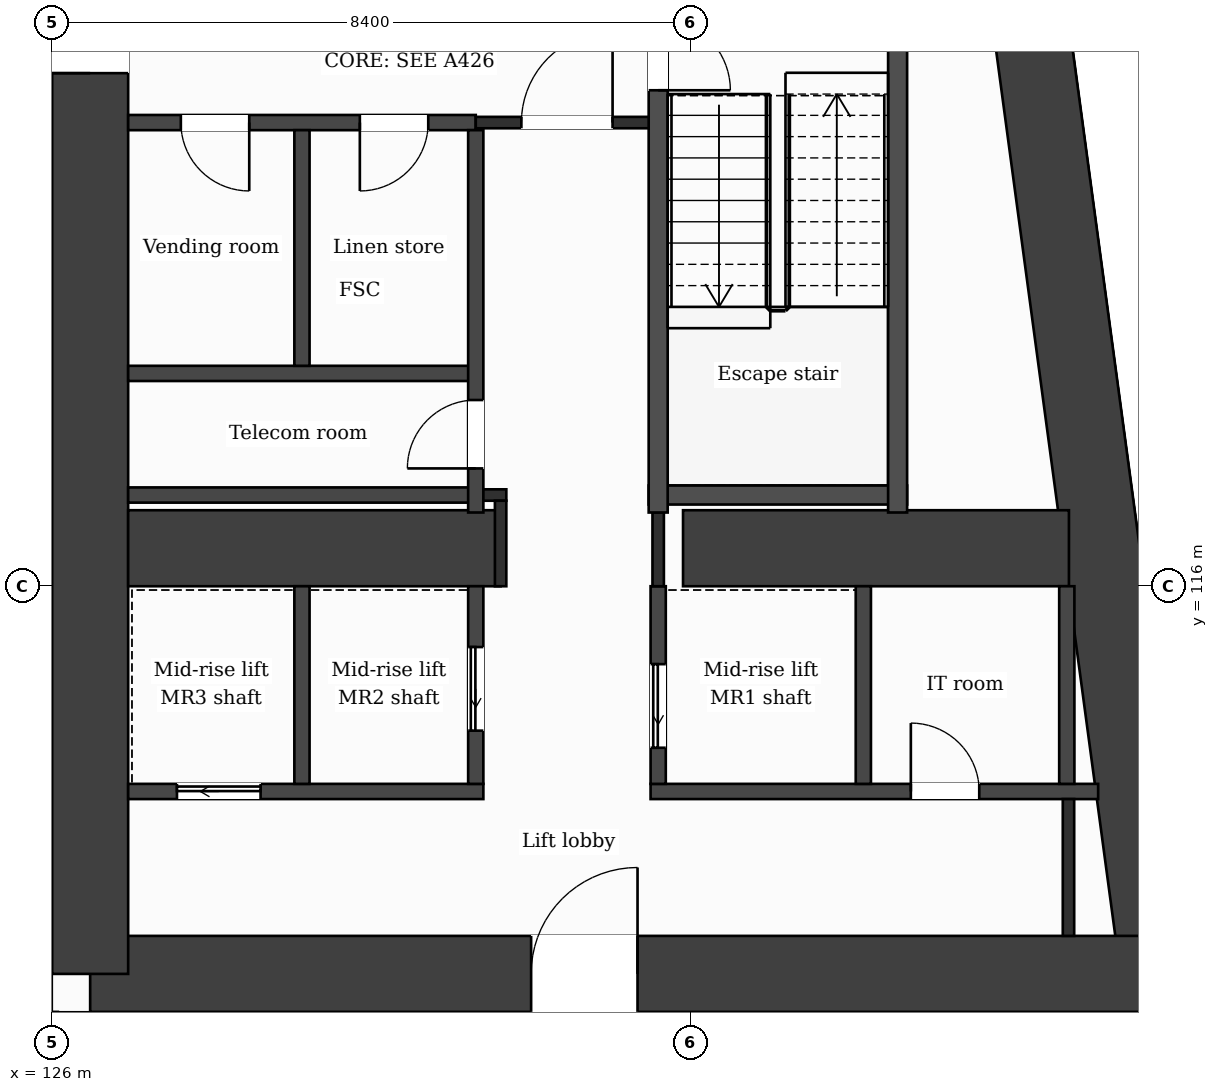
"""IFC4 building model, lengths in metres.
Left out: names, types, materials, properties, quantities, classifications, styles, units other than length and angle.
Written with IfcOpenShell. Run it as: python <this file> out.ifc"""

import sys

from ifc_helpers import new_model, si_unit, direction, frame, frame_2d, origin, place, context, subcontext, project, spatial, rectangle, extrude, element, fill, save


model = new_model("IFC4")
c1 = context("Model", 3, precision=1e-05, world=origin(), true_north=direction((0.0, 1.0)))
c2 = subcontext(c1, "Body", "Model", "MODEL_VIEW")
j1 = project(units=[si_unit("LENGTHUNIT", "METRE"), si_unit("PLANEANGLEUNIT", "RADIAN")], contexts=[c1])
p1 = place(None, origin())
s1 = spatial("IfcSite", under=j1, at=p1, CompositionType="ELEMENT")
p2 = place(p1, origin())
s2 = spatial("IfcBuilding", under=s1, at=p2, CompositionType="ELEMENT")
p3 = place(p2, frame((0.0, 0.0, 109.5)))
s3 = spatial("IfcBuildingStorey", under=s2, at=p3, CompositionType="ELEMENT", Elevation=109.5)
p4 = place(p3, frame((137.732, 131.9, 0.0), z_axis=(0.0, 0.0, 1.0), x_axis=(0.133411141623, -0.991060778808, 0.0)))
e1 = element("IfcWall", 1, at=p4, inside=s3, PredefinedType="SHEAR", context=c2, shape_type="SweptSolid", body=[
    extrude(rectangle(XDim=21.189, YDim=1.0, at=frame_2d((10.595, 0.0))), origin(), (0.0, 0.0, 1.0), 3.7),
])
p5 = place(p3, frame((140.559, 110.9, 0.0), z_axis=(0.0, 0.0, 1.0), x_axis=(-1.0, 0.0, 0.0)))
e2 = element("IfcWall", 2, at=p5, inside=s3, PredefinedType="SHEAR", context=c2, shape_type="SweptSolid", body=[
    extrude(rectangle(XDim=14.059, YDim=1.0, at=frame_2d((7.029, 0.0))), origin(), (0.0, 0.0, 1.0), 3.7),
])
p6 = place(p5, frame((6.858, 0.0, 0.0)))
e3 = element("IfcOpeningElement", 3, at=p6, cuts=e2, PredefinedType="OPENING", context=c2, shape_type="SweptSolid", body=[
    extrude(rectangle(XDim=1.4, YDim=2.1, at=frame_2d((0.7, 1.05))), frame((0.0, 0.51, 0.0), z_axis=(0.0, -1.0, 0.0), x_axis=(1.0, 0.0, 0.0)), (0.0, 0.0, 1.0), 1.02),
])
p7 = place(p3, frame((126.5, 110.9, 0.0), z_axis=(0.0, 0.0, 1.0), x_axis=(0.0, 1.0, 0.0)))
e4 = element("IfcWall", 4, at=p7, inside=s3, PredefinedType="SHEAR", context=c2, shape_type="SweptSolid", body=[
    extrude(rectangle(XDim=21.0, YDim=1.0, at=frame_2d((10.5, 0.0))), origin(), (0.0, 0.0, 1.0), 3.7),
])
p8 = place(p7, frame((11.85, 0.0, 0.0)))
e5 = element("IfcOpeningElement", 5, at=p8, cuts=e4, PredefinedType="OPENING", context=c2, shape_type="SweptSolid", body=[
    extrude(rectangle(XDim=1.4, YDim=2.1, at=frame_2d((0.7, 1.05))), frame((0.0, 0.51, 0.0), z_axis=(0.0, -1.0, 0.0), x_axis=(1.0, 0.0, 0.0)), (0.0, 0.0, 1.0), 1.02),
])
p9 = place(p3, frame((127.0, 116.5, 0.0), z_axis=(0.0, 0.0, 1.0), x_axis=(1.0, 0.0, 0.0)))
e6 = element("IfcWall", 6, at=p9, inside=s3, PredefinedType="SHEAR", context=c2, shape_type="SweptSolid", body=[
    extrude(rectangle(XDim=4.9, YDim=1.0, at=frame_2d((2.45, 0.0))), origin(), (0.0, 0.0, 1.0), 3.7),
])
p10 = place(p3, frame((134.3, 116.5, 0.0), z_axis=(0.0, 0.0, 1.0), x_axis=(1.0, 0.0, 0.0)))
e7 = element("IfcWall", 7, at=p10, inside=s3, PredefinedType="SHEAR", context=c2, shape_type="SweptSolid", body=[
    extrude(rectangle(XDim=5.077, YDim=1.0, at=frame_2d((2.539, 0.0))), origin(), (0.0, 0.0, 1.0), 3.7),
])
p11 = place(p3, frame((140.348, 103.85, 0.0), z_axis=(0.0, 0.0, 1.0), x_axis=(-0.133431549479, 0.991058031401, 0.0)))
e8 = element("IfcWall", 8, at=p11, inside=s3, PredefinedType="SOLIDWALL", context=c2, shape_type="SweptSolid", body=[
    extrude(rectangle(XDim=6.609, YDim=0.3, at=frame_2d((3.304, 0.0))), origin(), (0.0, 0.0, 1.0), 3.38),
])
p12 = place(p11, frame((0.737, 0.0, 0.9)))
e9 = element("IfcOpeningElement", 9, at=p12, cuts=e8, PredefinedType="OPENING", context=c2, shape_type="SweptSolid", body=[
    extrude(rectangle(XDim=1.2, YDim=2.1, at=frame_2d((0.6, 1.05))), frame((0.0, 0.16, 0.0), z_axis=(0.0, -1.0, 0.0), x_axis=(1.0, 0.0, 0.0)), (0.0, 0.0, 1.0), 0.32),
])
p13 = place(p11, frame((3.991, 0.0, 0.0)))
e10 = element("IfcOpeningElement", 10, at=p13, cuts=e8, PredefinedType="OPENING", context=c2, shape_type="SweptSolid", body=[
    extrude(rectangle(XDim=1.2, YDim=2.4, at=frame_2d((0.6, 1.2))), frame((0.0, 0.16, 0.0), z_axis=(0.0, -1.0, 0.0), x_axis=(1.0, 0.0, 0.0)), (0.0, 0.0, 1.0), 0.32),
])
p14 = place(p3, frame((127.0, 113.3, 0.0), z_axis=(0.0, 0.0, 1.0), x_axis=(1.0, 0.0, 0.0)))
e11 = element("IfcWall", 11, at=p14, inside=s3, PredefinedType="PARTITIONING", context=c2, shape_type="SweptSolid", body=[
    extrude(rectangle(XDim=4.673, YDim=0.2, at=frame_2d((2.336, 0.0))), origin(), (0.0, 0.0, 1.0), 3.38),
])
p15 = place(p14, frame((0.642, 0.0, 0.0)))
e12 = element("IfcOpeningElement", 12, at=p15, cuts=e11, PredefinedType="OPENING", context=c2, shape_type="SweptSolid", body=[
    extrude(rectangle(XDim=1.1, YDim=2.1, at=frame_2d((0.55, 1.05))), frame((0.0, 0.11, 0.0), z_axis=(0.0, -1.0, 0.0), x_axis=(1.0, 0.0, 0.0)), (0.0, 0.0, 1.0), 0.22),
])
p16 = place(p3, frame((133.873, 113.3, 0.0), z_axis=(0.0, 0.0, 1.0), x_axis=(1.0, 0.0, 0.0)))
e13 = element("IfcWall", 13, at=p16, inside=s3, PredefinedType="PARTITIONING", context=c2, shape_type="SweptSolid", body=[
    extrude(rectangle(XDim=5.888, YDim=0.2, at=frame_2d((2.944, 0.0))), origin(), (0.0, 0.0, 1.0), 3.38),
])
p17 = place(p16, frame((3.424, 0.0, 0.0)))
e14 = element("IfcOpeningElement", 14, at=p17, cuts=e13, PredefinedType="OPENING", context=c2, shape_type="SweptSolid", body=[
    extrude(rectangle(XDim=0.9, YDim=2.1, at=frame_2d((0.45, 1.05))), frame((0.0, 0.11, 0.0), z_axis=(0.0, -1.0, 0.0), x_axis=(1.0, 0.0, 0.0)), (0.0, 0.0, 1.0), 0.22),
])
p18 = place(p3, frame((127.0, 117.2, 0.0), z_axis=(0.0, 0.0, 1.0), x_axis=(1.0, 0.0, 0.0)))
e15 = element("IfcWall", 15, at=p18, inside=s3, PredefinedType="PARTITIONING", context=c2, shape_type="SweptSolid", body=[
    extrude(rectangle(XDim=4.573, YDim=0.2, at=frame_2d((2.287, 0.0))), origin(), (0.0, 0.0, 1.0), 3.38),
])
p19 = place(p3, frame((131.573, 117.2, 0.0), z_axis=(0.0, 0.0, 1.0), x_axis=(1.0, 0.0, 0.0)))
e16 = element("IfcWall", 16, at=p19, inside=s3, PredefinedType="PARTITIONING", context=c2, shape_type="SweptSolid", body=[
    extrude(rectangle(XDim=0.402, YDim=0.15, at=frame_2d((0.201, 0.0))), origin(), (0.0, 0.0, 1.0), 3.38),
])
p20 = place(p3, frame((133.848, 117.2, 0.0), z_axis=(0.0, 0.0, 1.0), x_axis=(1.0, 0.0, 0.0)))
e17 = element("IfcWall", 17, at=p20, inside=s3, PredefinedType="PARTITIONING", context=c2, shape_type="SweptSolid", body=[
    extrude(rectangle(XDim=3.4, YDim=0.25, at=frame_2d((1.7, 0.0))), origin(), (0.0, 0.0, 1.0), 3.38),
])
p21 = place(p3, frame((127.0, 118.8, 0.0), z_axis=(0.0, 0.0, 1.0), x_axis=(1.0, 0.0, 0.0)))
e18 = element("IfcWall", 18, at=p21, inside=s3, PredefinedType="PARTITIONING", context=c2, shape_type="SweptSolid", body=[
    extrude(rectangle(XDim=4.573, YDim=0.2, at=frame_2d((2.287, 0.0))), origin(), (0.0, 0.0, 1.0), 3.38),
])
p22 = place(p3, frame((127.0, 122.1, 0.0), z_axis=(0.0, 0.0, 1.0), x_axis=(1.0, 0.0, 0.0)))
e19 = element("IfcWall", 19, at=p22, inside=s3, PredefinedType="PARTITIONING", context=c2, shape_type="SweptSolid", body=[
    extrude(rectangle(XDim=4.573, YDim=0.2, at=frame_2d((2.287, 0.0))), origin(), (0.0, 0.0, 1.0), 3.38),
])
p23 = place(p22, frame((3.048, 0.0, 0.0)))
e20 = element("IfcOpeningElement", 20, at=p23, cuts=e19, PredefinedType="OPENING", context=c2, shape_type="SweptSolid", body=[
    extrude(rectangle(XDim=0.9, YDim=2.1, at=frame_2d((0.45, 1.05))), frame((0.0, 0.11, 0.0), z_axis=(0.0, -1.0, 0.0), x_axis=(1.0, 0.0, 0.0)), (0.0, 0.0, 1.0), 0.22),
])
p24 = place(p22, frame((0.693, 0.0, 0.0)))
e21 = element("IfcOpeningElement", 21, at=p24, cuts=e19, PredefinedType="OPENING", context=c2, shape_type="SweptSolid", body=[
    extrude(rectangle(XDim=0.9, YDim=2.1, at=frame_2d((0.45, 1.05))), frame((0.0, 0.11, 0.0), z_axis=(0.0, -1.0, 0.0), x_axis=(1.0, 0.0, 0.0)), (0.0, 0.0, 1.0), 0.22),
])
p25 = place(p3, frame((131.573, 122.1, 0.0), z_axis=(0.0, 0.0, 1.0), x_axis=(1.0, 0.0, 0.0)))
e22 = element("IfcWall", 22, at=p25, inside=s3, PredefinedType="PARTITIONING", context=c2, shape_type="SweptSolid", body=[
    extrude(rectangle(XDim=2.4, YDim=0.15, at=frame_2d((1.2, 0.0))), origin(), (0.0, 0.0, 1.0), 3.38),
])
p26 = place(p25, frame((0.6, 0.0, 0.0)))
e23 = element("IfcOpeningElement", 23, at=p26, cuts=e22, PredefinedType="OPENING", context=c2, shape_type="SweptSolid", body=[
    extrude(rectangle(XDim=1.2, YDim=2.1, at=frame_2d((0.6, 1.05))), frame((0.0, 0.085, 0.0), z_axis=(0.0, -1.0, 0.0), x_axis=(1.0, 0.0, 0.0)), (0.0, 0.0, 1.0), 0.17),
])
p27 = place(p3, frame((100.8, 122.45, 0.0), z_axis=(0.0, 0.0, 1.0), x_axis=(1.0, 0.0, 0.0)))
e24 = element("IfcWall", 24, at=p27, inside=s3, PredefinedType="PARTITIONING", context=c2, shape_type="SweptSolid", body=[
    extrude(rectangle(XDim=25.2, YDim=0.15, at=frame_2d((12.6, 0.0))), origin(), (0.0, 0.0, 1.0), 3.38),
])
p28 = place(p3, frame((126.0, 109.075, 0.0), z_axis=(0.0, 0.0, 1.0), x_axis=(0.0, 1.0, 0.0)))
e25 = element("IfcWall", 25, at=p28, inside=s3, PredefinedType="PARTITIONING", context=c2, shape_type="SweptSolid", body=[
    extrude(rectangle(XDim=1.325, YDim=0.15, at=frame_2d((0.663, 0.0))), origin(), (0.0, 0.0, 1.0), 3.38),
])
p29 = place(p3, frame((129.287, 113.4, 0.0), z_axis=(0.0, 0.0, 1.0), x_axis=(0.0, 1.0, 0.0)))
e26 = element("IfcWall", 26, at=p29, inside=s3, PredefinedType="PARTITIONING", context=c2, shape_type="SweptSolid", body=[
    extrude(rectangle(XDim=2.6, YDim=0.2, at=frame_2d((1.3, 0.0))), origin(), (0.0, 0.0, 1.0), 3.38),
])
p30 = place(p3, frame((129.287, 118.9, 0.0), z_axis=(0.0, 0.0, 1.0), x_axis=(0.0, 1.0, 0.0)))
e27 = element("IfcWall", 27, at=p30, inside=s3, PredefinedType="PARTITIONING", context=c2, shape_type="SweptSolid", body=[
    extrude(rectangle(XDim=3.1, YDim=0.2, at=frame_2d((1.55, 0.0))), origin(), (0.0, 0.0, 1.0), 3.38),
])
p31 = place(p3, frame((131.573, 113.4, 0.0), z_axis=(0.0, 0.0, 1.0), x_axis=(0.0, 1.0, 0.0)))
e28 = element("IfcWall", 28, at=p31, inside=s3, PredefinedType="PARTITIONING", context=c2, shape_type="SweptSolid", body=[
    extrude(rectangle(XDim=2.6, YDim=0.2, at=frame_2d((1.3, 0.0))), origin(), (0.0, 0.0, 1.0), 3.38),
])
p32 = place(p31, frame((0.7, 0.0, 0.0)))
e29 = element("IfcOpeningElement", 29, at=p32, cuts=e28, PredefinedType="OPENING", context=c2, shape_type="SweptSolid", body=[
    extrude(rectangle(XDim=1.1, YDim=2.1, at=frame_2d((0.55, 1.05))), frame((0.0, 0.11, 0.0), z_axis=(0.0, -1.0, 0.0), x_axis=(1.0, 0.0, 0.0)), (0.0, 0.0, 1.0), 0.22),
])
p33 = place(p3, frame((131.573, 116.97, 0.0), z_axis=(0.0, 0.0, 1.0), x_axis=(0.0, 1.0, 0.0)))
e30 = element("IfcWall", 30, at=p33, inside=s3, PredefinedType="PARTITIONING", context=c2, shape_type="SweptSolid", body=[
    extrude(rectangle(XDim=5.03, YDim=0.2, at=frame_2d((2.515, 0.0))), origin(), (0.0, 0.0, 1.0), 3.38),
])
p34 = place(p33, frame((0.58, 0.0, 0.0)))
e31 = element("IfcOpeningElement", 31, at=p34, cuts=e30, PredefinedType="OPENING", context=c2, shape_type="SweptSolid", body=[
    extrude(rectangle(XDim=0.9, YDim=2.1, at=frame_2d((0.45, 1.05))), frame((0.0, 0.11, 0.0), z_axis=(0.0, -1.0, 0.0), x_axis=(1.0, 0.0, 0.0)), (0.0, 0.0, 1.0), 0.22),
])
p35 = place(p3, frame((131.9, 116.0, 0.0), z_axis=(0.0, 0.0, 1.0), x_axis=(0.0, 1.0, 0.0)))
e32 = element("IfcWall", 32, at=p35, inside=s3, PredefinedType="PARTITIONING", context=c2, shape_type="SweptSolid", body=[
    extrude(rectangle(XDim=1.125, YDim=0.15, at=frame_2d((0.562, 0.0))), origin(), (0.0, 0.0, 1.0), 3.38),
])
p36 = place(p3, frame((133.973, 113.4, 0.0), z_axis=(0.0, 0.0, 1.0), x_axis=(0.0, 1.0, 0.0)))
e33 = element("IfcWall", 33, at=p36, inside=s3, PredefinedType="PARTITIONING", context=c2, shape_type="SweptSolid", body=[
    extrude(rectangle(XDim=2.6, YDim=0.2, at=frame_2d((1.3, 0.0))), origin(), (0.0, 0.0, 1.0), 3.38),
])
p37 = place(p36, frame((0.475, 0.0, 0.0)))
e34 = element("IfcOpeningElement", 34, at=p37, cuts=e33, PredefinedType="OPENING", context=c2, shape_type="SweptSolid", body=[
    extrude(rectangle(XDim=1.1, YDim=2.1, at=frame_2d((0.55, 1.05))), frame((0.0, 0.11, 0.0), z_axis=(0.0, -1.0, 0.0), x_axis=(1.0, 0.0, 0.0)), (0.0, 0.0, 1.0), 0.22),
])
p38 = place(p3, frame((133.973, 116.0, 0.0), z_axis=(0.0, 0.0, 1.0), x_axis=(0.0, 1.0, 0.0)))
e35 = element("IfcWall", 35, at=p38, inside=s3, PredefinedType="PARTITIONING", context=c2, shape_type="SweptSolid", body=[
    extrude(rectangle(XDim=0.97, YDim=0.15, at=frame_2d((0.485, 0.0))), origin(), (0.0, 0.0, 1.0), 3.38),
])
p39 = place(p3, frame((133.973, 116.97, 0.0), z_axis=(0.0, 0.0, 1.0), x_axis=(0.0, 1.0, 0.0)))
e36 = element("IfcWall", 36, at=p39, inside=s3, PredefinedType="PARTITIONING", context=c2, shape_type="SweptSolid", body=[
    extrude(rectangle(XDim=6.855, YDim=0.25, at=frame_2d((3.427, 0.0))), origin(), (0.0, 0.0, 1.0), 3.38),
])
p40 = place(p39, frame((5.555, 0.0, 0.0)))
e37 = element("IfcOpeningElement", 37, at=p40, cuts=e36, PredefinedType="OPENING", context=c2, shape_type="SweptSolid", body=[
    extrude(rectangle(XDim=0.95, YDim=2.1, at=frame_2d((0.475, 1.05))), frame((0.0, 0.135, 0.0), z_axis=(0.0, -1.0, 0.0), x_axis=(1.0, 0.0, 0.0)), (0.0, 0.0, 1.0), 0.27),
])
p41 = place(p3, frame((136.672, 113.4, 0.0), z_axis=(0.0, 0.0, 1.0), x_axis=(0.0, 1.0, 0.0)))
e38 = element("IfcWall", 38, at=p41, inside=s3, PredefinedType="PARTITIONING", context=c2, shape_type="SweptSolid", body=[
    extrude(rectangle(XDim=2.6, YDim=0.2, at=frame_2d((1.3, 0.0))), origin(), (0.0, 0.0, 1.0), 3.38),
])
p42 = place(p3, frame((137.123, 116.97, 0.0), z_axis=(0.0, 0.0, 1.0), x_axis=(0.0, 1.0, 0.0)))
e39 = element("IfcWall", 39, at=p42, inside=s3, PredefinedType="PARTITIONING", context=c2, shape_type="SweptSolid", body=[
    extrude(rectangle(XDim=6.855, YDim=0.25, at=frame_2d((3.427, 0.0))), origin(), (0.0, 0.0, 1.0), 3.38),
])
p43 = place(p3, frame((139.349, 113.4, 0.0), z_axis=(0.0, 0.0, 1.0), x_axis=(0.0, 1.0, 0.0)))
e40 = element("IfcWall", 40, at=p43, inside=s3, PredefinedType="PARTITIONING", context=c2, shape_type="SweptSolid", body=[
    extrude(rectangle(XDim=2.6, YDim=0.2, at=frame_2d((1.3, 0.0))), origin(), (0.0, 0.0, 1.0), 3.38),
])
p44 = place(p3, frame((139.371, 111.4, 0.0), z_axis=(0.0, 0.0, 1.0), x_axis=(0.0, 1.0, 0.0)))
e41 = element("IfcWall", 41, at=p44, inside=s3, PredefinedType="PARTITIONING", context=c2, shape_type="SweptSolid", body=[
    extrude(rectangle(XDim=1.8, YDim=0.15, at=frame_2d((0.9, 0.0))), origin(), (0.0, 0.0, 1.0), 3.38),
])
p45 = place(p26, origin())
e42 = element("IfcDoor", 42, at=p45, inside=s3, OperationType="SINGLE_SWING_RIGHT", PredefinedType="DOOR", context=c2, shape_type="SweptSolid", body=[
    extrude(rectangle(XDim=1.2, YDim=2.1, at=frame_2d((0.6, 1.05))), frame((0.0, 0.025, 0.0), z_axis=(0.0, -1.0, 0.0), x_axis=(1.0, 0.0, 0.0)), (0.0, 0.0, 1.0), 0.05),
])
fill(e23, e42)
p46 = place(p23, origin())
e43 = element("IfcDoor", 43, at=p46, inside=s3, OperationType="SINGLE_SWING_LEFT", PredefinedType="DOOR", context=c2, shape_type="SweptSolid", body=[
    extrude(rectangle(XDim=0.9, YDim=2.1, at=frame_2d((0.45, 1.05))), frame((0.0, 0.025, 0.0), z_axis=(0.0, -1.0, 0.0), x_axis=(1.0, 0.0, 0.0)), (0.0, 0.0, 1.0), 0.05),
])
fill(e20, e43)
p47 = place(p24, origin())
e44 = element("IfcDoor", 44, at=p47, inside=s3, OperationType="SINGLE_SWING_RIGHT", PredefinedType="DOOR", context=c2, shape_type="SweptSolid", body=[
    extrude(rectangle(XDim=0.9, YDim=2.1, at=frame_2d((0.45, 1.05))), frame((0.0, 0.025, 0.0), z_axis=(0.0, -1.0, 0.0), x_axis=(1.0, 0.0, 0.0)), (0.0, 0.0, 1.0), 0.05),
])
fill(e21, e44)
p48 = place(p40, origin())
e45 = element("IfcDoor", 45, at=p48, inside=s3, OperationType="SINGLE_SWING_LEFT", PredefinedType="DOOR", context=c2, shape_type="SweptSolid", body=[
    extrude(rectangle(XDim=0.95, YDim=2.1, at=frame_2d((0.475, 1.05))), frame((0.0, 0.025, 0.0), z_axis=(0.0, -1.0, 0.0), x_axis=(1.0, 0.0, 0.0)), (0.0, 0.0, 1.0), 0.05),
])
fill(e37, e45)
p49 = place(p34, origin())
e46 = element("IfcDoor", 46, at=p49, inside=s3, OperationType="SINGLE_SWING_LEFT", PredefinedType="DOOR", context=c2, shape_type="SweptSolid", body=[
    extrude(rectangle(XDim=0.9, YDim=2.1, at=frame_2d((0.45, 1.05))), frame((0.0, 0.025, 0.0), z_axis=(0.0, -1.0, 0.0), x_axis=(1.0, 0.0, 0.0)), (0.0, 0.0, 1.0), 0.05),
])
fill(e31, e46)
p50 = place(p37, origin())
e47 = element("IfcDoor", 47, at=p50, inside=s3, OperationType="SLIDING_TO_LEFT", PredefinedType="DOOR", context=c2, shape_type="SweptSolid", body=[
    extrude(rectangle(XDim=1.1, YDim=2.1, at=frame_2d((0.55, 1.05))), frame((0.0, 0.025, 0.0), z_axis=(0.0, -1.0, 0.0), x_axis=(1.0, 0.0, 0.0)), (0.0, 0.0, 1.0), 0.05),
])
fill(e34, e47)
p51 = place(p32, origin())
e48 = element("IfcDoor", 48, at=p51, inside=s3, OperationType="SLIDING_TO_LEFT", PredefinedType="DOOR", context=c2, shape_type="SweptSolid", body=[
    extrude(rectangle(XDim=1.1, YDim=2.1, at=frame_2d((0.55, 1.05))), frame((0.0, 0.025, 0.0), z_axis=(0.0, -1.0, 0.0), x_axis=(1.0, 0.0, 0.0)), (0.0, 0.0, 1.0), 0.05),
])
fill(e29, e48)
p52 = place(p15, origin())
e49 = element("IfcDoor", 49, at=p52, inside=s3, OperationType="SLIDING_TO_LEFT", PredefinedType="DOOR", context=c2, shape_type="SweptSolid", body=[
    extrude(rectangle(XDim=1.1, YDim=2.1, at=frame_2d((0.55, 1.05))), frame((0.0, 0.025, 0.0), z_axis=(0.0, -1.0, 0.0), x_axis=(1.0, 0.0, 0.0)), (0.0, 0.0, 1.0), 0.05),
])
fill(e12, e49)
p53 = place(p17, origin())
e50 = element("IfcDoor", 50, at=p53, inside=s3, OperationType="SINGLE_SWING_LEFT", PredefinedType="DOOR", context=c2, shape_type="SweptSolid", body=[
    extrude(rectangle(XDim=0.9, YDim=2.1, at=frame_2d((0.45, 1.05))), frame((0.0, 0.025, 0.0), z_axis=(0.0, -1.0, 0.0), x_axis=(1.0, 0.0, 0.0)), (0.0, 0.0, 1.0), 0.05),
])
fill(e14, e50)
p54 = place(p6, origin())
e51 = element("IfcDoor", 51, at=p54, inside=s3, OperationType="SINGLE_SWING_LEFT", PredefinedType="DOOR", context=c2, shape_type="SweptSolid", body=[
    extrude(rectangle(XDim=1.4, YDim=2.1, at=frame_2d((0.7, 1.05))), frame((0.0, 0.025, 0.0), z_axis=(0.0, -1.0, 0.0), x_axis=(1.0, 0.0, 0.0)), (0.0, 0.0, 1.0), 0.05),
])
fill(e3, e51)
p55 = place(p8, origin())
e52 = element("IfcDoor", 52, at=p55, inside=s3, OperationType="SINGLE_SWING_LEFT", PredefinedType="DOOR", context=c2, shape_type="SweptSolid", body=[
    extrude(rectangle(XDim=1.4, YDim=2.1, at=frame_2d((0.7, 1.05))), frame((0.0, 0.025, 0.0), z_axis=(0.0, -1.0, 0.0), x_axis=(1.0, 0.0, 0.0)), (0.0, 0.0, 1.0), 0.05),
])
fill(e5, e52)
save(model, sys.argv[1])
